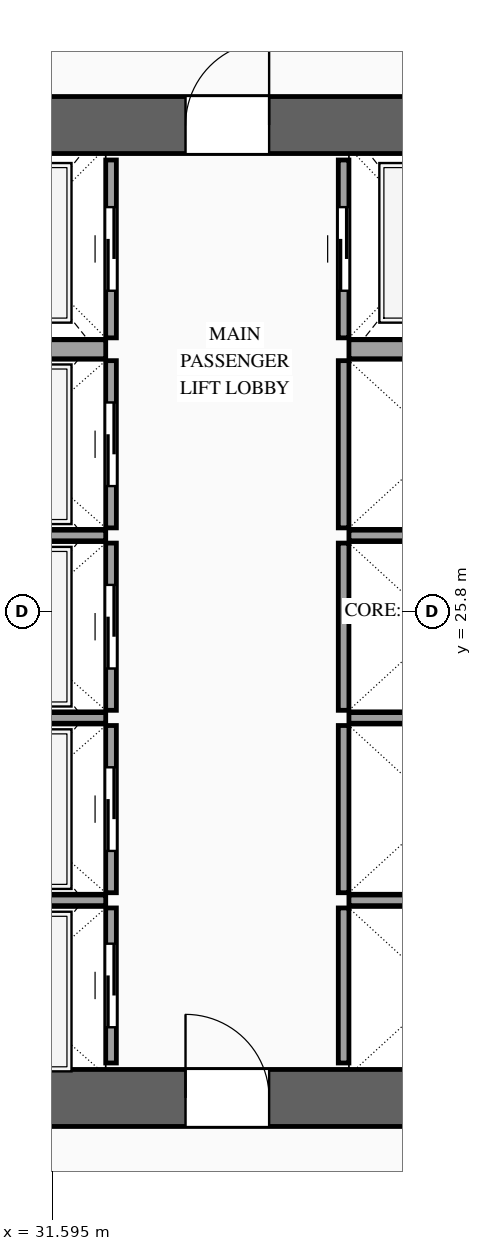
"""IFC4 building model, lengths in metres.
Left out: names, types, materials, properties, quantities, classifications, styles, units other than length and angle.
Written with IfcOpenShell. Run it as: python <this file> out.ifc"""

import sys

from ifc_helpers import new_model, si_unit, direction, frame, frame_2d, origin, place, context, subcontext, project, spatial, rectangle, extrude, source, transform, mapped, element, fill, save


model = new_model("IFC4")
c1 = context("Model", 3, precision=1e-05, world=origin(), true_north=direction((0.0, 1.0)))
c2 = subcontext(c1, "Body", "Model", "MODEL_VIEW")
j1 = project(units=[si_unit("LENGTHUNIT", "METRE"), si_unit("PLANEANGLEUNIT", "RADIAN")], contexts=[c1])
p1 = place(None, origin())
s1 = spatial("IfcSite", under=j1, at=p1, CompositionType="ELEMENT")
p2 = place(p1, origin())
s2 = spatial("IfcBuilding", under=s1, at=p2, CompositionType="ELEMENT")
p3 = place(p2, frame((0.0, 0.0, 90.2)))
s3 = spatial("IfcBuildingStorey", under=s2, at=p3, CompositionType="ELEMENT", Elevation=90.2)
p4 = place(p3, frame((23.425, 19.4, 0.0), z_axis=(0.0, 0.0, 1.0), x_axis=(1.0, 0.0, 0.0)))
e1 = element("IfcWall", 1, at=p4, inside=s3, PredefinedType="SHEAR", context=c2, shape_type="SweptSolid", body=[
    extrude(rectangle(XDim=27.15, YDim=0.75, at=frame_2d((13.575, 0.0))), origin(), (0.0, 0.0, 1.0), 3.6),
])
p5 = place(p4, frame((2.025, 0.0, 0.0)))
e2 = element("IfcOpeningElement", 2, at=p5, cuts=e1, PredefinedType="OPENING", context=c2, shape_type="SweptSolid", body=[
    extrude(rectangle(XDim=1.1, YDim=2.2, at=frame_2d((0.55, 1.1))), frame((0.0, 0.39, 0.0), z_axis=(0.0, -1.0, 0.0), x_axis=(1.0, 0.0, 0.0)), (0.0, 0.0, 1.0), 0.78),
])
p6 = place(p4, frame((9.925, 0.0, 0.0)))
e3 = element("IfcOpeningElement", 3, at=p6, cuts=e1, PredefinedType="OPENING", context=c2, shape_type="SweptSolid", body=[
    extrude(rectangle(XDim=1.1, YDim=2.2, at=frame_2d((0.55, 1.1))), frame((0.0, 0.39, 0.0), z_axis=(0.0, -1.0, 0.0), x_axis=(1.0, 0.0, 0.0)), (0.0, 0.0, 1.0), 0.78),
])
p7 = place(p4, frame((23.125, 0.0, 0.0)))
e4 = element("IfcOpeningElement", 4, at=p7, cuts=e1, PredefinedType="OPENING", context=c2, shape_type="SweptSolid", body=[
    extrude(rectangle(XDim=1.1, YDim=2.2, at=frame_2d((0.55, 1.1))), frame((0.0, 0.39, 0.0), z_axis=(0.0, -1.0, 0.0), x_axis=(1.0, 0.0, 0.0)), (0.0, 0.0, 1.0), 0.78),
])
p8 = place(p4, frame((19.745, 0.0, 0.0)))
e5 = element("IfcOpeningElement", 5, at=p8, cuts=e1, PredefinedType="OPENING", context=c2, shape_type="SweptSolid", body=[
    extrude(rectangle(XDim=0.9, YDim=2.15, at=frame_2d((0.45, 1.075))), frame((0.0, 0.39, 0.0), z_axis=(0.0, -1.0, 0.0), x_axis=(1.0, 0.0, 0.0)), (0.0, 0.0, 1.0), 0.78),
])
p9 = place(p4, frame((18.305, 0.0, 0.0)))
e6 = element("IfcOpeningElement", 6, at=p9, cuts=e1, PredefinedType="OPENING", context=c2, shape_type="SweptSolid", body=[
    extrude(rectangle(XDim=0.9, YDim=2.15, at=frame_2d((0.45, 1.075))), frame((0.0, 0.39, 0.0), z_axis=(0.0, -1.0, 0.0), x_axis=(1.0, 0.0, 0.0)), (0.0, 0.0, 1.0), 0.78),
])
p10 = place(p3, frame((23.425, 32.2, 0.0), z_axis=(0.0, 0.0, 1.0), x_axis=(1.0, 0.0, 0.0)))
e7 = element("IfcWall", 7, at=p10, inside=s3, PredefinedType="SHEAR", context=c2, shape_type="SweptSolid", body=[
    extrude(rectangle(XDim=27.15, YDim=0.75, at=frame_2d((13.575, 0.0))), origin(), (0.0, 0.0, 1.0), 3.6),
])
p11 = place(p10, frame((4.645, 0.0, 0.0)))
e8 = element("IfcOpeningElement", 8, at=p11, cuts=e7, PredefinedType="OPENING", context=c2, shape_type="SweptSolid", body=[
    extrude(rectangle(XDim=0.9, YDim=2.15, at=frame_2d((0.45, 1.075))), frame((0.0, 0.39, 0.0), z_axis=(0.0, -1.0, 0.0), x_axis=(1.0, 0.0, 0.0)), (0.0, 0.0, 1.0), 0.78),
])
p12 = place(p10, frame((9.925, 0.0, 0.0)))
e9 = element("IfcOpeningElement", 9, at=p12, cuts=e7, PredefinedType="OPENING", context=c2, shape_type="SweptSolid", body=[
    extrude(rectangle(XDim=1.1, YDim=2.2, at=frame_2d((0.55, 1.1))), frame((0.0, 0.39, 0.0), z_axis=(0.0, -1.0, 0.0), x_axis=(1.0, 0.0, 0.0)), (0.0, 0.0, 1.0), 0.78),
])
p13 = place(p10, frame((15.775, 0.0, 0.0)))
e10 = element("IfcOpeningElement", 10, at=p13, cuts=e7, PredefinedType="OPENING", context=c2, shape_type="SweptSolid", body=[
    extrude(rectangle(XDim=1.1, YDim=2.2, at=frame_2d((0.55, 1.1))), frame((0.0, 0.39, 0.0), z_axis=(0.0, -1.0, 0.0), x_axis=(1.0, 0.0, 0.0)), (0.0, 0.0, 1.0), 0.78),
])
p14 = place(p10, frame((18.975, 0.0, 0.0)))
e11 = element("IfcOpeningElement", 11, at=p14, cuts=e7, PredefinedType="OPENING", context=c2, shape_type="SweptSolid", body=[
    extrude(rectangle(XDim=0.9, YDim=2.15, at=frame_2d((0.45, 1.075))), frame((0.0, 0.39, 0.0), z_axis=(0.0, -1.0, 0.0), x_axis=(1.0, 0.0, 0.0)), (0.0, 0.0, 1.0), 0.78),
])
p15 = place(p3, frame((32.37, 19.86, 0.0), z_axis=(0.0, 0.0, 1.0), x_axis=(0.0, 1.0, 0.0)))
e12 = element("IfcWall", 12, at=p15, inside=s3, PredefinedType="SOLIDWALL", context=c2, shape_type="SweptSolid", body=[
    extrude(rectangle(XDim=2.04, YDim=0.14, at=frame_2d((1.02, 0.0))), origin(), (0.0, 0.0, 1.0), 3.38),
])
p16 = place(p15, frame((0.47, 0.0, 0.0)))
e13 = element("IfcOpeningElement", 13, at=p16, cuts=e12, PredefinedType="OPENING", context=c2, shape_type="SweptSolid", body=[
    extrude(rectangle(XDim=1.1, YDim=2.2, at=frame_2d((0.55, 1.1))), frame((0.0, 0.085, 0.0), z_axis=(0.0, -1.0, 0.0), x_axis=(1.0, 0.0, 0.0)), (0.0, 0.0, 1.0), 0.17),
])
m1 = source(origin(), c2, "Body", "SweptSolid", [
    extrude(rectangle(XDim=2.5, YDim=0.14, at=frame_2d((1.25, 0.0))), origin(), (0.0, 0.0, 1.0), 3.38),
])
p17 = place(p3, frame((29.8, 22.0, 0.0), z_axis=(0.0, 0.0, 1.0), x_axis=(1.0, 0.0, 0.0)))
e14 = element("IfcWall", 14, at=p17, inside=s3, PredefinedType="SOLIDWALL", context=c2, shape_type="MappedRepresentation", body=[
    mapped(m1, transform((0.0, 0.0, 0.0), scale=1.0)),
])
p18 = place(p3, frame((32.37, 22.1, 0.0), z_axis=(0.0, 0.0, 1.0), x_axis=(0.0, 1.0, 0.0)))
e15 = element("IfcWall", 15, at=p18, inside=s3, PredefinedType="SOLIDWALL", context=c2, shape_type="SweptSolid", body=[
    extrude(rectangle(XDim=2.2, YDim=0.14, at=frame_2d((1.1, 0.0))), origin(), (0.0, 0.0, 1.0), 3.38),
])
p19 = place(p18, frame((0.55, 0.0, 0.0)))
e16 = element("IfcOpeningElement", 16, at=p19, cuts=e15, PredefinedType="OPENING", context=c2, shape_type="SweptSolid", body=[
    extrude(rectangle(XDim=1.1, YDim=2.2, at=frame_2d((0.55, 1.1))), frame((0.0, 0.085, 0.0), z_axis=(0.0, -1.0, 0.0), x_axis=(1.0, 0.0, 0.0)), (0.0, 0.0, 1.0), 0.17),
])
p20 = place(p3, frame((29.8, 24.4, 0.0), z_axis=(0.0, 0.0, 1.0), x_axis=(1.0, 0.0, 0.0)))
e17 = element("IfcWall", 17, at=p20, inside=s3, PredefinedType="SOLIDWALL", context=c2, shape_type="MappedRepresentation", body=[
    mapped(m1, transform((0.0, 0.0, 0.0), scale=1.0)),
])
p21 = place(p3, frame((32.37, 24.5, 0.0), z_axis=(0.0, 0.0, 1.0), x_axis=(0.0, 1.0, 0.0)))
e18 = element("IfcWall", 18, at=p21, inside=s3, PredefinedType="SOLIDWALL", context=c2, shape_type="SweptSolid", body=[
    extrude(rectangle(XDim=2.2, YDim=0.14, at=frame_2d((1.1, 0.0))), origin(), (0.0, 0.0, 1.0), 3.38),
])
p22 = place(p21, frame((0.55, 0.0, 0.0)))
e19 = element("IfcOpeningElement", 19, at=p22, cuts=e18, PredefinedType="OPENING", context=c2, shape_type="SweptSolid", body=[
    extrude(rectangle(XDim=1.1, YDim=2.2, at=frame_2d((0.55, 1.1))), frame((0.0, 0.085, 0.0), z_axis=(0.0, -1.0, 0.0), x_axis=(1.0, 0.0, 0.0)), (0.0, 0.0, 1.0), 0.17),
])
p23 = place(p3, frame((29.8, 26.8, 0.0), z_axis=(0.0, 0.0, 1.0), x_axis=(1.0, 0.0, 0.0)))
e20 = element("IfcWall", 20, at=p23, inside=s3, PredefinedType="SOLIDWALL", context=c2, shape_type="MappedRepresentation", body=[
    mapped(m1, transform((0.0, 0.0, 0.0), scale=1.0)),
])
p24 = place(p3, frame((32.37, 26.9, 0.0), z_axis=(0.0, 0.0, 1.0), x_axis=(0.0, 1.0, 0.0)))
e21 = element("IfcWall", 21, at=p24, inside=s3, PredefinedType="SOLIDWALL", context=c2, shape_type="SweptSolid", body=[
    extrude(rectangle(XDim=2.2, YDim=0.14, at=frame_2d((1.1, 0.0))), origin(), (0.0, 0.0, 1.0), 3.38),
])
p25 = place(p24, frame((0.55, 0.0, 0.0)))
e22 = element("IfcOpeningElement", 22, at=p25, cuts=e21, PredefinedType="OPENING", context=c2, shape_type="SweptSolid", body=[
    extrude(rectangle(XDim=1.1, YDim=2.2, at=frame_2d((0.55, 1.1))), frame((0.0, 0.085, 0.0), z_axis=(0.0, -1.0, 0.0), x_axis=(1.0, 0.0, 0.0)), (0.0, 0.0, 1.0), 0.17),
])
p26 = place(p3, frame((32.37, 29.4, 0.0), z_axis=(0.0, 0.0, 1.0), x_axis=(0.0, 1.0, 0.0)))
e23 = element("IfcWall", 23, at=p26, inside=s3, PredefinedType="SOLIDWALL", context=c2, shape_type="SweptSolid", body=[
    extrude(rectangle(XDim=2.34, YDim=0.14, at=frame_2d((1.17, 0.0))), origin(), (0.0, 0.0, 1.0), 3.38),
])
p27 = place(p26, frame((0.62, 0.0, 0.0)))
e24 = element("IfcOpeningElement", 24, at=p27, cuts=e23, PredefinedType="OPENING", context=c2, shape_type="SweptSolid", body=[
    extrude(rectangle(XDim=1.1, YDim=2.2, at=frame_2d((0.55, 1.1))), frame((0.0, 0.085, 0.0), z_axis=(0.0, -1.0, 0.0), x_axis=(1.0, 0.0, 0.0)), (0.0, 0.0, 1.0), 0.17),
])
m2 = source(origin(), c2, "Body", "SweptSolid", [
    extrude(rectangle(XDim=2.5, YDim=0.25, at=frame_2d((1.25, 0.0))), origin(), (0.0, 0.0, 1.0), 3.38),
])
p28 = place(p3, frame((29.8, 29.25, 0.0), z_axis=(0.0, 0.0, 1.0), x_axis=(1.0, 0.0, 0.0)))
e25 = element("IfcWall", 25, at=p28, inside=s3, PredefinedType="SOLIDWALL", context=c2, shape_type="MappedRepresentation", body=[
    mapped(m2, transform((0.0, 0.0, 0.0), scale=1.0)),
])
m3 = source(origin(), c2, "Body", "SweptSolid", [
    extrude(rectangle(XDim=2.04, YDim=0.14, at=frame_2d((1.02, 0.0))), origin(), (0.0, 0.0, 1.0), 3.38),
])
p29 = place(p3, frame((35.43, 19.86, 0.0), z_axis=(0.0, 0.0, 1.0), x_axis=(0.0, 1.0, 0.0)))
e26 = element("IfcWall", 26, at=p29, inside=s3, PredefinedType="SOLIDWALL", context=c2, shape_type="MappedRepresentation", body=[
    mapped(m3, transform((0.0, 0.0, 0.0), scale=1.0)),
])
m4 = source(origin(), c2, "Body", "SweptSolid", [
    extrude(rectangle(XDim=2.4, YDim=0.14, at=frame_2d((1.2, 0.0))), origin(), (0.0, 0.0, 1.0), 3.38),
])
p30 = place(p3, frame((35.5, 22.0, 0.0), z_axis=(0.0, 0.0, 1.0), x_axis=(1.0, 0.0, 0.0)))
e27 = element("IfcWall", 27, at=p30, inside=s3, PredefinedType="SOLIDWALL", context=c2, shape_type="MappedRepresentation", body=[
    mapped(m4, transform((0.0, 0.0, 0.0), scale=1.0)),
])
m5 = source(origin(), c2, "Body", "SweptSolid", [
    extrude(rectangle(XDim=2.2, YDim=0.14, at=frame_2d((1.1, 0.0))), origin(), (0.0, 0.0, 1.0), 3.38),
])
p31 = place(p3, frame((35.43, 22.1, 0.0), z_axis=(0.0, 0.0, 1.0), x_axis=(0.0, 1.0, 0.0)))
e28 = element("IfcWall", 28, at=p31, inside=s3, PredefinedType="SOLIDWALL", context=c2, shape_type="MappedRepresentation", body=[
    mapped(m5, transform((0.0, 0.0, 0.0), scale=1.0)),
])
p32 = place(p3, frame((35.5, 24.4, 0.0), z_axis=(0.0, 0.0, 1.0), x_axis=(1.0, 0.0, 0.0)))
e29 = element("IfcWall", 29, at=p32, inside=s3, PredefinedType="SOLIDWALL", context=c2, shape_type="MappedRepresentation", body=[
    mapped(m4, transform((0.0, 0.0, 0.0), scale=1.0)),
])
p33 = place(p3, frame((35.43, 24.5, 0.0), z_axis=(0.0, 0.0, 1.0), x_axis=(0.0, 1.0, 0.0)))
e30 = element("IfcWall", 30, at=p33, inside=s3, PredefinedType="SOLIDWALL", context=c2, shape_type="MappedRepresentation", body=[
    mapped(m5, transform((0.0, 0.0, 0.0), scale=1.0)),
])
p34 = place(p3, frame((35.5, 26.8, 0.0), z_axis=(0.0, 0.0, 1.0), x_axis=(1.0, 0.0, 0.0)))
e31 = element("IfcWall", 31, at=p34, inside=s3, PredefinedType="SOLIDWALL", context=c2, shape_type="MappedRepresentation", body=[
    mapped(m4, transform((0.0, 0.0, 0.0), scale=1.0)),
])
m6 = source(origin(), c2, "Body", "SweptSolid", [
    extrude(rectangle(XDim=2.2, YDim=0.14, at=frame_2d((1.1, 0.0))), origin(), (0.0, 0.0, 1.0), 3.38),
])
p35 = place(p3, frame((35.43, 26.9, 0.0), z_axis=(0.0, 0.0, 1.0), x_axis=(0.0, 1.0, 0.0)))
e32 = element("IfcWall", 32, at=p35, inside=s3, PredefinedType="SOLIDWALL", context=c2, shape_type="MappedRepresentation", body=[
    mapped(m6, transform((0.0, 0.0, 0.0), scale=1.0)),
])
p36 = place(p3, frame((35.43, 29.4, 0.0), z_axis=(0.0, 0.0, 1.0), x_axis=(0.0, 1.0, 0.0)))
e33 = element("IfcWall", 33, at=p36, inside=s3, PredefinedType="SOLIDWALL", context=c2, shape_type="SweptSolid", body=[
    extrude(rectangle(XDim=2.34, YDim=0.14, at=frame_2d((1.17, 0.0))), origin(), (0.0, 0.0, 1.0), 3.38),
])
p37 = place(p36, frame((0.62, 0.0, 0.0)))
e34 = element("IfcOpeningElement", 34, at=p37, cuts=e33, PredefinedType="OPENING", context=c2, shape_type="SweptSolid", body=[
    extrude(rectangle(XDim=1.1, YDim=2.2, at=frame_2d((0.55, 1.1))), frame((0.0, 0.085, 0.0), z_axis=(0.0, -1.0, 0.0), x_axis=(1.0, 0.0, 0.0)), (0.0, 0.0, 1.0), 0.17),
])
m7 = source(origin(), c2, "Body", "SweptSolid", [
    extrude(rectangle(XDim=2.4, YDim=0.25, at=frame_2d((1.2, 0.0))), origin(), (0.0, 0.0, 1.0), 3.38),
])
p38 = place(p3, frame((35.5, 29.25, 0.0), z_axis=(0.0, 0.0, 1.0), x_axis=(1.0, 0.0, 0.0)))
e35 = element("IfcWall", 35, at=p38, inside=s3, PredefinedType="SOLIDWALL", context=c2, shape_type="MappedRepresentation", body=[
    mapped(m7, transform((0.0, 0.0, 0.0), scale=1.0)),
])
m8 = source(origin(), c2, "Body", "SweptSolid", [
    extrude(rectangle(XDim=1.1, YDim=2.2, at=frame_2d((0.55, 1.1))), frame((0.0, 0.025, 0.0), z_axis=(0.0, -1.0, 0.0), x_axis=(1.0, 0.0, 0.0)), (0.0, 0.0, 1.0), 0.05),
])
p39 = place(p16, origin())
e36 = element("IfcDoor", 36, at=p39, inside=s3, OperationType="SLIDING_TO_LEFT", PredefinedType="DOOR", context=c2, shape_type="MappedRepresentation", body=[
    mapped(m8, transform((0.0, 0.0, 0.0), scale=1.0)),
])
fill(e13, e36)
p40 = place(p19, origin())
e37 = element("IfcDoor", 37, at=p40, inside=s3, OperationType="SLIDING_TO_RIGHT", PredefinedType="DOOR", context=c2, shape_type="MappedRepresentation", body=[
    mapped(m8, transform((0.0, 0.0, 0.0), scale=1.0)),
])
fill(e16, e37)
p41 = place(p22, origin())
e38 = element("IfcDoor", 38, at=p41, inside=s3, OperationType="SLIDING_TO_LEFT", PredefinedType="DOOR", context=c2, shape_type="MappedRepresentation", body=[
    mapped(m8, transform((0.0, 0.0, 0.0), scale=1.0)),
])
fill(e19, e38)
p42 = place(p25, origin())
e39 = element("IfcDoor", 39, at=p42, inside=s3, OperationType="SLIDING_TO_RIGHT", PredefinedType="DOOR", context=c2, shape_type="MappedRepresentation", body=[
    mapped(m8, transform((0.0, 0.0, 0.0), scale=1.0)),
])
fill(e22, e39)
p43 = place(p27, origin())
e40 = element("IfcDoor", 40, at=p43, inside=s3, OperationType="SLIDING_TO_LEFT", PredefinedType="DOOR", context=c2, shape_type="MappedRepresentation", body=[
    mapped(m8, transform((0.0, 0.0, 0.0), scale=1.0)),
])
fill(e24, e40)
p44 = place(p37, origin())
e41 = element("IfcDoor", 41, at=p44, inside=s3, OperationType="SLIDING_TO_RIGHT", PredefinedType="DOOR", context=c2, shape_type="MappedRepresentation", body=[
    mapped(m8, transform((0.0, 0.0, 0.0), scale=1.0)),
])
fill(e34, e41)
m9 = source(origin(), c2, "Body", "SweptSolid", [
    extrude(rectangle(XDim=1.1, YDim=2.2, at=frame_2d((0.55, 1.1))), frame((0.0, 0.025, 0.0), z_axis=(0.0, -1.0, 0.0), x_axis=(1.0, 0.0, 0.0)), (0.0, 0.0, 1.0), 0.05),
])
p45 = place(p6, origin())
e42 = element("IfcDoor", 42, at=p45, inside=s3, OperationType="SINGLE_SWING_LEFT", PredefinedType="DOOR", context=c2, shape_type="MappedRepresentation", body=[
    mapped(m9, transform((0.0, 0.0, 0.0), scale=1.0)),
])
fill(e3, e42)
p46 = place(p12, origin())
e43 = element("IfcDoor", 43, at=p46, inside=s3, OperationType="SINGLE_SWING_RIGHT", PredefinedType="DOOR", context=c2, shape_type="MappedRepresentation", body=[
    mapped(m9, transform((0.0, 0.0, 0.0), scale=1.0)),
])
fill(e9, e43)
save(model, sys.argv[1])
